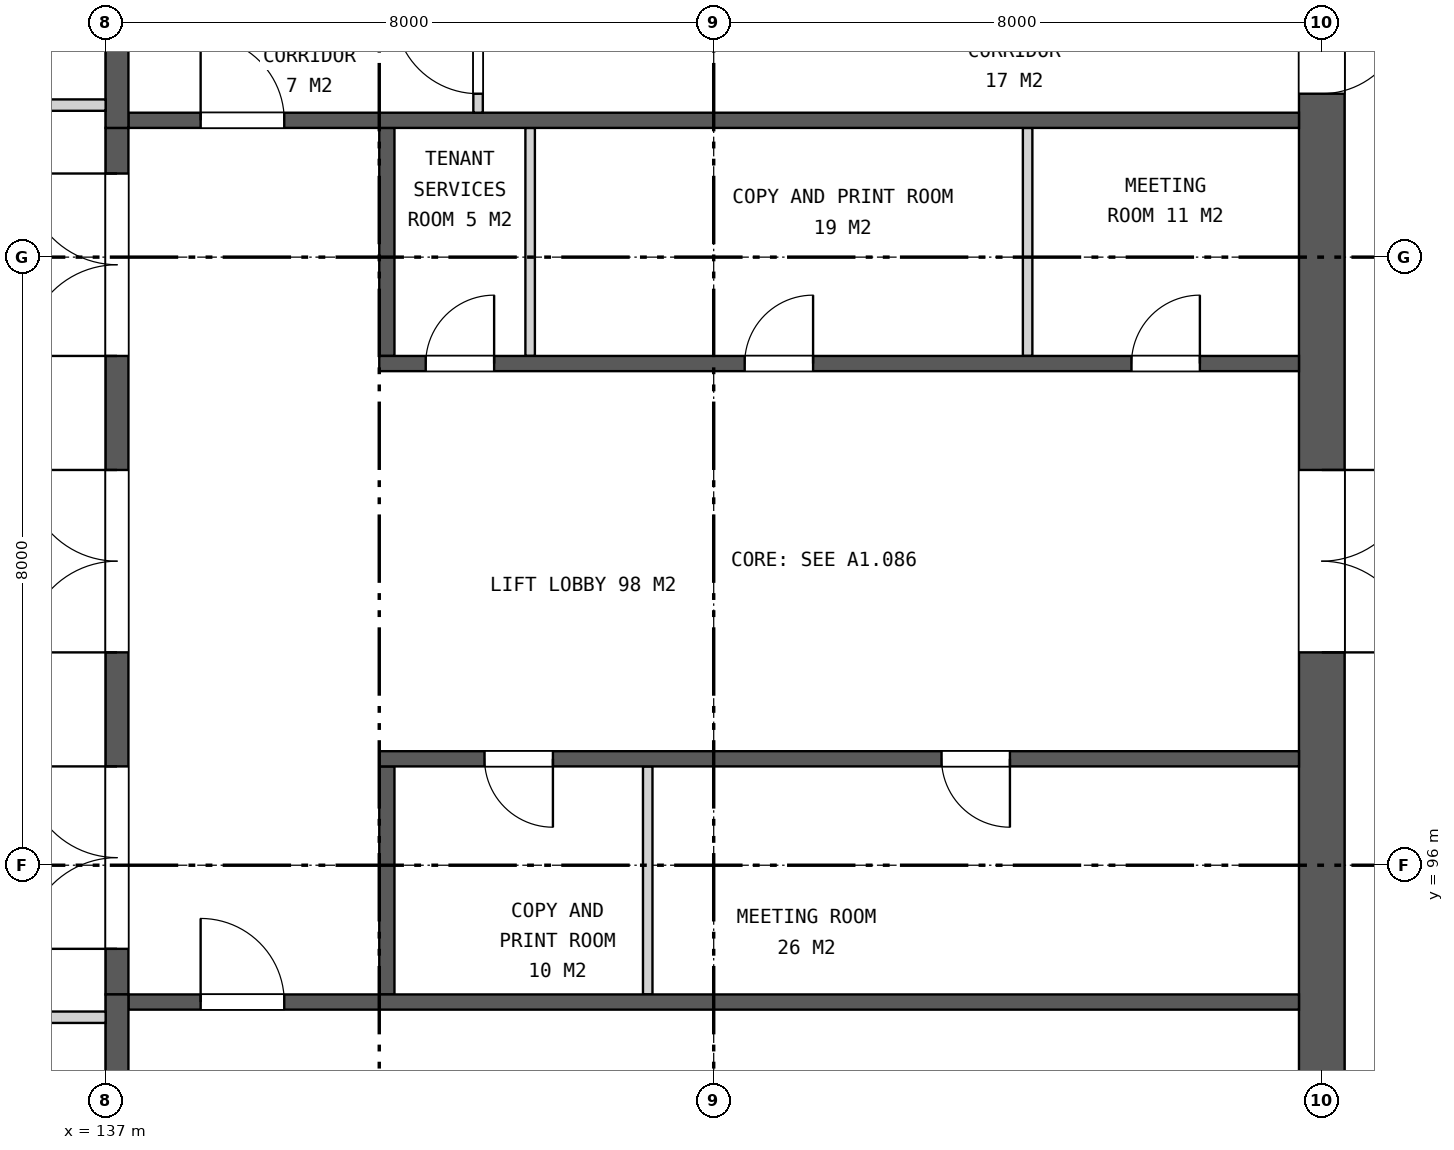
"""IFC4 building model, lengths in metres.
Left out: names, types, materials, properties, quantities, classifications, styles, units other than length and angle.
Written with IfcOpenShell. Run it as: python <this file> out.ifc"""

import sys

from ifc_helpers import new_model, si_unit, direction, frame, frame_2d, origin, place, context, subcontext, project, spatial, rectangle, extrude, element, fill, save


model = new_model("IFC4")
c1 = context("Model", 3, precision=1e-05, world=origin(), true_north=direction((0.0, 1.0)))
c2 = subcontext(c1, "Body", "Model", "MODEL_VIEW")
j1 = project(units=[si_unit("LENGTHUNIT", "METRE"), si_unit("PLANEANGLEUNIT", "RADIAN")], contexts=[c1])
p1 = place(None, origin())
s1 = spatial("IfcSite", under=j1, at=p1, CompositionType="ELEMENT")
p2 = place(p1, origin())
s2 = spatial("IfcBuilding", under=s1, at=p2, CompositionType="ELEMENT")
p3 = place(p2, frame((0.0, 0.0, 178.9)))
s3 = spatial("IfcBuildingStorey", under=s2, at=p3, CompositionType="ELEMENT", Elevation=178.9)
p4 = place(p3, frame((153.0, 88.3, 0.0), z_axis=(0.0, 0.0, 1.0), x_axis=(0.0, 1.0, 0.0)))
e1 = element("IfcWall", 1, at=p4, inside=s3, PredefinedType="SHEAR", context=c2, shape_type="SweptSolid", body=[
    extrude(rectangle(XDim=23.4, YDim=0.6, at=frame_2d((11.7, 0.0))), origin(), (0.0, 0.0, 1.0), 4.2),
])
p5 = place(p4, frame((10.5, 0.0, 0.0)))
e2 = element("IfcOpeningElement", 2, at=p5, cuts=e1, PredefinedType="OPENING", context=c2, shape_type="SweptSolid", body=[
    extrude(rectangle(XDim=2.4, YDim=2.4, at=frame_2d((1.2, 1.2))), frame((0.0, 0.31, 0.0), z_axis=(0.0, -1.0, 0.0), x_axis=(1.0, 0.0, 0.0)), (0.0, 0.0, 1.0), 0.62),
])
p6 = place(p4, frame((17.85, 0.0, 0.0)))
e3 = element("IfcOpeningElement", 3, at=p6, cuts=e1, PredefinedType="OPENING", context=c2, shape_type="SweptSolid", body=[
    extrude(rectangle(XDim=1.1, YDim=2.1, at=frame_2d((0.55, 1.05))), frame((0.0, 0.31, 0.0), z_axis=(0.0, -1.0, 0.0), x_axis=(1.0, 0.0, 0.0)), (0.0, 0.0, 1.0), 0.62),
])
p7 = place(p3, frame((137.15, 94.3, 0.0), z_axis=(0.0, 0.0, 1.0), x_axis=(0.0, 1.0, 0.0)))
e4 = element("IfcWall", 4, at=p7, inside=s3, PredefinedType="SHEAR", context=c2, shape_type="SweptSolid", body=[
    extrude(rectangle(XDim=11.4, YDim=0.3, at=frame_2d((5.7, 0.0))), origin(), (0.0, 0.0, 1.0), 4.2),
])
p8 = place(p7, frame((0.6, 0.0, 0.0)))
e5 = element("IfcOpeningElement", 5, at=p8, cuts=e4, PredefinedType="OPENING", context=c2, shape_type="SweptSolid", body=[
    extrude(rectangle(XDim=2.4, YDim=2.4, at=frame_2d((1.2, 1.2))), frame((0.0, 0.16, 0.0), z_axis=(0.0, -1.0, 0.0), x_axis=(1.0, 0.0, 0.0)), (0.0, 0.0, 1.0), 0.32),
])
p9 = place(p7, frame((4.5, 0.0, 0.0)))
e6 = element("IfcOpeningElement", 6, at=p9, cuts=e4, PredefinedType="OPENING", context=c2, shape_type="SweptSolid", body=[
    extrude(rectangle(XDim=2.4, YDim=2.4, at=frame_2d((1.2, 1.2))), frame((0.0, 0.16, 0.0), z_axis=(0.0, -1.0, 0.0), x_axis=(1.0, 0.0, 0.0)), (0.0, 0.0, 1.0), 0.32),
])
p10 = place(p7, frame((8.4, 0.0, 0.0)))
e7 = element("IfcOpeningElement", 7, at=p10, cuts=e4, PredefinedType="OPENING", context=c2, shape_type="SweptSolid", body=[
    extrude(rectangle(XDim=2.4, YDim=2.4, at=frame_2d((1.2, 1.2))), frame((0.0, 0.16, 0.0), z_axis=(0.0, -1.0, 0.0), x_axis=(1.0, 0.0, 0.0)), (0.0, 0.0, 1.0), 0.32),
])
p11 = place(p3, frame((140.7, 102.7, 0.0), z_axis=(0.0, 0.0, 1.0), x_axis=(0.0, 1.0, 0.0)))
e8 = element("IfcWall", 8, at=p11, inside=s3, PredefinedType="SHEAR", context=c2, shape_type="SweptSolid", body=[
    extrude(rectangle(XDim=3.0, YDim=0.2, at=frame_2d((1.5, 0.0))), origin(), (0.0, 0.0, 1.0), 4.2),
])
for number, where, z_axis, x_axis in (
    (9, (142.585, 102.7, 0.0), (0.0, 0.0, 1.0), (0.0, 1.0, 0.0)),
    (10, (149.13, 102.7, 0.0), (0.0, 0.0, 1.0), (0.0, 1.0, 0.0)),
):
    element("IfcWall", number, at=place(p3, frame(where, z_axis=z_axis, x_axis=x_axis)), inside=s3, PredefinedType="PARTITIONING", context=c2, shape_type="SweptSolid", body=[
        extrude(rectangle(XDim=3.0, YDim=0.125, at=frame_2d((1.5, 0.0))), origin(), (0.0, 0.0, 1.0), 4.2),
    ])
p12 = place(p3, frame((140.6, 102.6, 0.0), z_axis=(0.0, 0.0, 1.0), x_axis=(1.0, 0.0, 0.0)))
e11 = element("IfcWall", 11, at=p12, inside=s3, PredefinedType="SHEAR", context=c2, shape_type="SweptSolid", body=[
    extrude(rectangle(XDim=12.1, YDim=0.2, at=frame_2d((6.05, 0.0))), origin(), (0.0, 0.0, 1.0), 4.2),
])
p13 = place(p12, frame((0.611, 0.0, 0.0)))
e12 = element("IfcOpeningElement", 12, at=p13, cuts=e11, PredefinedType="OPENING", context=c2, shape_type="SweptSolid", body=[
    extrude(rectangle(XDim=0.9, YDim=2.1, at=frame_2d((0.45, 1.05))), frame((0.0, 0.11, 0.0), z_axis=(0.0, -1.0, 0.0), x_axis=(1.0, 0.0, 0.0)), (0.0, 0.0, 1.0), 0.22),
])
p14 = place(p12, frame((4.808, 0.0, 0.0)))
e13 = element("IfcOpeningElement", 13, at=p14, cuts=e11, PredefinedType="OPENING", context=c2, shape_type="SweptSolid", body=[
    extrude(rectangle(XDim=0.9, YDim=2.1, at=frame_2d((0.45, 1.05))), frame((0.0, 0.11, 0.0), z_axis=(0.0, -1.0, 0.0), x_axis=(1.0, 0.0, 0.0)), (0.0, 0.0, 1.0), 0.22),
])
p15 = place(p12, frame((9.896, 0.0, 0.0)))
e14 = element("IfcOpeningElement", 14, at=p15, cuts=e11, PredefinedType="OPENING", context=c2, shape_type="SweptSolid", body=[
    extrude(rectangle(XDim=0.9, YDim=2.1, at=frame_2d((0.45, 1.05))), frame((0.0, 0.11, 0.0), z_axis=(0.0, -1.0, 0.0), x_axis=(1.0, 0.0, 0.0)), (0.0, 0.0, 1.0), 0.22),
])
p16 = place(p3, frame((140.7, 94.3, 0.0), z_axis=(0.0, 0.0, 1.0), x_axis=(0.0, 1.0, 0.0)))
e15 = element("IfcWall", 15, at=p16, inside=s3, PredefinedType="SHEAR", context=c2, shape_type="SweptSolid", body=[
    extrude(rectangle(XDim=3.0, YDim=0.2, at=frame_2d((1.5, 0.0))), origin(), (0.0, 0.0, 1.0), 4.2),
])
p17 = place(p3, frame((144.132, 94.3, 0.0), z_axis=(0.0, 0.0, 1.0), x_axis=(0.0, 1.0, 0.0)))
e16 = element("IfcWall", 16, at=p17, inside=s3, PredefinedType="PARTITIONING", context=c2, shape_type="SweptSolid", body=[
    extrude(rectangle(XDim=3.0, YDim=0.125, at=frame_2d((1.5, 0.0))), origin(), (0.0, 0.0, 1.0), 4.2),
])
p18 = place(p3, frame((140.6, 97.4, 0.0), z_axis=(0.0, 0.0, 1.0), x_axis=(1.0, 0.0, 0.0)))
e17 = element("IfcWall", 17, at=p18, inside=s3, PredefinedType="SHEAR", context=c2, shape_type="SweptSolid", body=[
    extrude(rectangle(XDim=12.1, YDim=0.2, at=frame_2d((6.05, 0.0))), origin(), (0.0, 0.0, 1.0), 4.2),
])
p19 = place(p18, frame((1.385, 0.0, 0.0)))
e18 = element("IfcOpeningElement", 18, at=p19, cuts=e17, PredefinedType="OPENING", context=c2, shape_type="SweptSolid", body=[
    extrude(rectangle(XDim=0.9, YDim=2.1, at=frame_2d((0.45, 1.05))), frame((0.0, 0.11, 0.0), z_axis=(0.0, -1.0, 0.0), x_axis=(1.0, 0.0, 0.0)), (0.0, 0.0, 1.0), 0.22),
])
p20 = place(p18, frame((7.397, 0.0, 0.0)))
e19 = element("IfcOpeningElement", 19, at=p20, cuts=e17, PredefinedType="OPENING", context=c2, shape_type="SweptSolid", body=[
    extrude(rectangle(XDim=0.9, YDim=2.1, at=frame_2d((0.45, 1.05))), frame((0.0, 0.11, 0.0), z_axis=(0.0, -1.0, 0.0), x_axis=(1.0, 0.0, 0.0)), (0.0, 0.0, 1.0), 0.22),
])
p21 = place(p3, frame((137.3, 105.8, 0.0), z_axis=(0.0, 0.0, 1.0), x_axis=(1.0, 0.0, 0.0)))
e20 = element("IfcWall", 20, at=p21, inside=s3, PredefinedType="SHEAR", context=c2, shape_type="SweptSolid", body=[
    extrude(rectangle(XDim=15.4, YDim=0.2, at=frame_2d((7.7, 0.0))), origin(), (0.0, 0.0, 1.0), 4.2),
])
p22 = place(p21, frame((0.95, 0.0, 0.0)))
e21 = element("IfcOpeningElement", 21, at=p22, cuts=e20, PredefinedType="OPENING", context=c2, shape_type="SweptSolid", body=[
    extrude(rectangle(XDim=1.1, YDim=2.1, at=frame_2d((0.55, 1.05))), frame((0.0, 0.11, 0.0), z_axis=(0.0, -1.0, 0.0), x_axis=(1.0, 0.0, 0.0)), (0.0, 0.0, 1.0), 0.22),
])
p23 = place(p3, frame((137.15, 105.7, 0.0), z_axis=(0.0, 0.0, 1.0), x_axis=(0.0, 1.0, 0.0)))
e22 = element("IfcWall", 22, at=p23, inside=s3, PredefinedType="SHEAR", context=c2, shape_type="SweptSolid", body=[
    extrude(rectangle(XDim=6.0, YDim=0.3, at=frame_2d((3.0, 0.0))), origin(), (0.0, 0.0, 1.0), 4.2),
])
p24 = place(p3, frame((141.9, 105.9, 0.0), z_axis=(0.0, 0.0, 1.0), x_axis=(0.0, 1.0, 0.0)))
e23 = element("IfcWall", 23, at=p24, inside=s3, PredefinedType="PARTITIONING", context=c2, shape_type="SweptSolid", body=[
    extrude(rectangle(XDim=1.6, YDim=0.125, at=frame_2d((0.8, 0.0))), origin(), (0.0, 0.0, 1.0), 4.2),
])
p25 = place(p24, frame((0.25, 0.0, 0.0)))
e24 = element("IfcOpeningElement", 24, at=p25, cuts=e23, PredefinedType="OPENING", context=c2, shape_type="SweptSolid", body=[
    extrude(rectangle(XDim=1.1, YDim=2.1, at=frame_2d((0.55, 1.05))), frame((0.0, 0.073, 0.0), z_axis=(0.0, -1.0, 0.0), x_axis=(1.0, 0.0, 0.0)), (0.0, 0.0, 1.0), 0.145),
])
p26 = place(p3, frame((137.3, 94.2, 0.0), z_axis=(0.0, 0.0, 1.0), x_axis=(1.0, 0.0, 0.0)))
e25 = element("IfcWall", 25, at=p26, inside=s3, PredefinedType="SHEAR", context=c2, shape_type="SweptSolid", body=[
    extrude(rectangle(XDim=15.4, YDim=0.2, at=frame_2d((7.7, 0.0))), origin(), (0.0, 0.0, 1.0), 4.2),
])
p27 = place(p26, frame((0.95, 0.0, 0.0)))
e26 = element("IfcOpeningElement", 26, at=p27, cuts=e25, PredefinedType="OPENING", context=c2, shape_type="SweptSolid", body=[
    extrude(rectangle(XDim=1.1, YDim=2.1, at=frame_2d((0.55, 1.05))), frame((0.0, 0.11, 0.0), z_axis=(0.0, -1.0, 0.0), x_axis=(1.0, 0.0, 0.0)), (0.0, 0.0, 1.0), 0.22),
])
p28 = place(p3, frame((137.15, 88.3, 0.0), z_axis=(0.0, 0.0, 1.0), x_axis=(0.0, 1.0, 0.0)))
e27 = element("IfcWall", 27, at=p28, inside=s3, PredefinedType="SHEAR", context=c2, shape_type="SweptSolid", body=[
    extrude(rectangle(XDim=6.0, YDim=0.3, at=frame_2d((3.0, 0.0))), origin(), (0.0, 0.0, 1.0), 4.2),
])
p29 = place(p3, frame((131.5, 94.0, 0.0), z_axis=(0.0, 0.0, 1.0), x_axis=(1.0, 0.0, 0.0)))
e28 = element("IfcWall", 28, at=p29, inside=s3, PredefinedType="PARTITIONING", context=c2, shape_type="SweptSolid", body=[
    extrude(rectangle(XDim=5.5, YDim=0.15, at=frame_2d((2.75, 0.0))), origin(), (0.0, 0.0, 1.0), 3.44),
])
p30 = place(p3, frame((131.475, 106.0, 0.0), z_axis=(0.0, 0.0, 1.0), x_axis=(1.0, 0.0, 0.0)))
e29 = element("IfcWall", 29, at=p30, inside=s3, PredefinedType="PARTITIONING", context=c2, shape_type="SweptSolid", body=[
    extrude(rectangle(XDim=5.525, YDim=0.15, at=frame_2d((2.762, 0.0))), origin(), (0.0, 0.0, 1.0), 3.44),
])
p31 = place(p5, frame((2.4, 0.0, 0.0), z_axis=(0.0, 0.0, 1.0), x_axis=(-1.0, 0.0, 0.0)))
e30 = element("IfcDoor", 30, at=p31, inside=s3, OperationType="DOUBLE_DOOR_SINGLE_SWING", PredefinedType="DOOR", context=c2, shape_type="SweptSolid", body=[
    extrude(rectangle(XDim=2.4, YDim=2.4, at=frame_2d((1.2, 1.2))), frame((0.0, 0.025, 0.0), z_axis=(0.0, -1.0, 0.0), x_axis=(1.0, 0.0, 0.0)), (0.0, 0.0, 1.0), 0.05),
])
fill(e2, e30)
p32 = place(p8, origin())
e31 = element("IfcDoor", 31, at=p32, inside=s3, OperationType="DOUBLE_DOOR_SINGLE_SWING", PredefinedType="DOOR", context=c2, shape_type="SweptSolid", body=[
    extrude(rectangle(XDim=2.4, YDim=2.4, at=frame_2d((1.2, 1.2))), frame((0.0, 0.025, 0.0), z_axis=(0.0, -1.0, 0.0), x_axis=(1.0, 0.0, 0.0)), (0.0, 0.0, 1.0), 0.05),
])
fill(e5, e31)
p33 = place(p9, origin())
e32 = element("IfcDoor", 32, at=p33, inside=s3, OperationType="DOUBLE_DOOR_SINGLE_SWING", PredefinedType="DOOR", context=c2, shape_type="SweptSolid", body=[
    extrude(rectangle(XDim=2.4, YDim=2.4, at=frame_2d((1.2, 1.2))), frame((0.0, 0.025, 0.0), z_axis=(0.0, -1.0, 0.0), x_axis=(1.0, 0.0, 0.0)), (0.0, 0.0, 1.0), 0.05),
])
fill(e6, e32)
p34 = place(p10, origin())
e33 = element("IfcDoor", 33, at=p34, inside=s3, OperationType="DOUBLE_DOOR_SINGLE_SWING", PredefinedType="DOOR", context=c2, shape_type="SweptSolid", body=[
    extrude(rectangle(XDim=2.4, YDim=2.4, at=frame_2d((1.2, 1.2))), frame((0.0, 0.025, 0.0), z_axis=(0.0, -1.0, 0.0), x_axis=(1.0, 0.0, 0.0)), (0.0, 0.0, 1.0), 0.05),
])
fill(e7, e33)
p35 = place(p13, origin())
e34 = element("IfcDoor", 34, at=p35, inside=s3, OperationType="SINGLE_SWING_RIGHT", PredefinedType="DOOR", context=c2, shape_type="SweptSolid", body=[
    extrude(rectangle(XDim=0.9, YDim=2.1, at=frame_2d((0.45, 1.05))), frame((0.0, 0.025, 0.0), z_axis=(0.0, -1.0, 0.0), x_axis=(1.0, 0.0, 0.0)), (0.0, 0.0, 1.0), 0.05),
])
fill(e12, e34)
p36 = place(p14, origin())
e35 = element("IfcDoor", 35, at=p36, inside=s3, OperationType="SINGLE_SWING_RIGHT", PredefinedType="DOOR", context=c2, shape_type="SweptSolid", body=[
    extrude(rectangle(XDim=0.9, YDim=2.1, at=frame_2d((0.45, 1.05))), frame((0.0, 0.025, 0.0), z_axis=(0.0, -1.0, 0.0), x_axis=(1.0, 0.0, 0.0)), (0.0, 0.0, 1.0), 0.05),
])
fill(e13, e35)
p37 = place(p15, origin())
e36 = element("IfcDoor", 36, at=p37, inside=s3, OperationType="SINGLE_SWING_RIGHT", PredefinedType="DOOR", context=c2, shape_type="SweptSolid", body=[
    extrude(rectangle(XDim=0.9, YDim=2.1, at=frame_2d((0.45, 1.05))), frame((0.0, 0.025, 0.0), z_axis=(0.0, -1.0, 0.0), x_axis=(1.0, 0.0, 0.0)), (0.0, 0.0, 1.0), 0.05),
])
fill(e14, e36)
p38 = place(p19, frame((0.9, 0.0, 0.0), z_axis=(0.0, 0.0, 1.0), x_axis=(-1.0, 0.0, 0.0)))
e37 = element("IfcDoor", 37, at=p38, inside=s3, OperationType="SINGLE_SWING_LEFT", PredefinedType="DOOR", context=c2, shape_type="SweptSolid", body=[
    extrude(rectangle(XDim=0.9, YDim=2.1, at=frame_2d((0.45, 1.05))), frame((0.0, 0.025, 0.0), z_axis=(0.0, -1.0, 0.0), x_axis=(1.0, 0.0, 0.0)), (0.0, 0.0, 1.0), 0.05),
])
fill(e18, e37)
p39 = place(p20, frame((0.9, 0.0, 0.0), z_axis=(0.0, 0.0, 1.0), x_axis=(-1.0, 0.0, 0.0)))
e38 = element("IfcDoor", 38, at=p39, inside=s3, OperationType="SINGLE_SWING_LEFT", PredefinedType="DOOR", context=c2, shape_type="SweptSolid", body=[
    extrude(rectangle(XDim=0.9, YDim=2.1, at=frame_2d((0.45, 1.05))), frame((0.0, 0.025, 0.0), z_axis=(0.0, -1.0, 0.0), x_axis=(1.0, 0.0, 0.0)), (0.0, 0.0, 1.0), 0.05),
])
fill(e19, e38)
p40 = place(p22, origin())
e39 = element("IfcDoor", 39, at=p40, inside=s3, OperationType="SINGLE_SWING_LEFT", PredefinedType="DOOR", context=c2, shape_type="SweptSolid", body=[
    extrude(rectangle(XDim=1.1, YDim=2.1, at=frame_2d((0.55, 1.05))), frame((0.0, 0.025, 0.0), z_axis=(0.0, -1.0, 0.0), x_axis=(1.0, 0.0, 0.0)), (0.0, 0.0, 1.0), 0.05),
])
fill(e21, e39)
p41 = place(p25, origin())
e40 = element("IfcDoor", 40, at=p41, inside=s3, OperationType="SINGLE_SWING_RIGHT", PredefinedType="DOOR", context=c2, shape_type="SweptSolid", body=[
    extrude(rectangle(XDim=1.1, YDim=2.1, at=frame_2d((0.55, 1.05))), frame((0.0, 0.025, 0.0), z_axis=(0.0, -1.0, 0.0), x_axis=(1.0, 0.0, 0.0)), (0.0, 0.0, 1.0), 0.05),
])
fill(e24, e40)
p42 = place(p27, origin())
e41 = element("IfcDoor", 41, at=p42, inside=s3, OperationType="SINGLE_SWING_LEFT", PredefinedType="DOOR", context=c2, shape_type="SweptSolid", body=[
    extrude(rectangle(XDim=1.1, YDim=2.1, at=frame_2d((0.55, 1.05))), frame((0.0, 0.025, 0.0), z_axis=(0.0, -1.0, 0.0), x_axis=(1.0, 0.0, 0.0)), (0.0, 0.0, 1.0), 0.05),
])
fill(e26, e41)
p43 = place(p6, frame((1.1, 0.0, 0.0), z_axis=(0.0, 0.0, 1.0), x_axis=(-1.0, 0.0, 0.0)))
e42 = element("IfcDoor", 42, at=p43, inside=s3, OperationType="SINGLE_SWING_LEFT", PredefinedType="DOOR", context=c2, shape_type="SweptSolid", body=[
    extrude(rectangle(XDim=1.1, YDim=2.1, at=frame_2d((0.55, 1.05))), frame((0.0, 0.025, 0.0), z_axis=(0.0, -1.0, 0.0), x_axis=(1.0, 0.0, 0.0)), (0.0, 0.0, 1.0), 0.05),
])
fill(e3, e42)
save(model, sys.argv[1])
